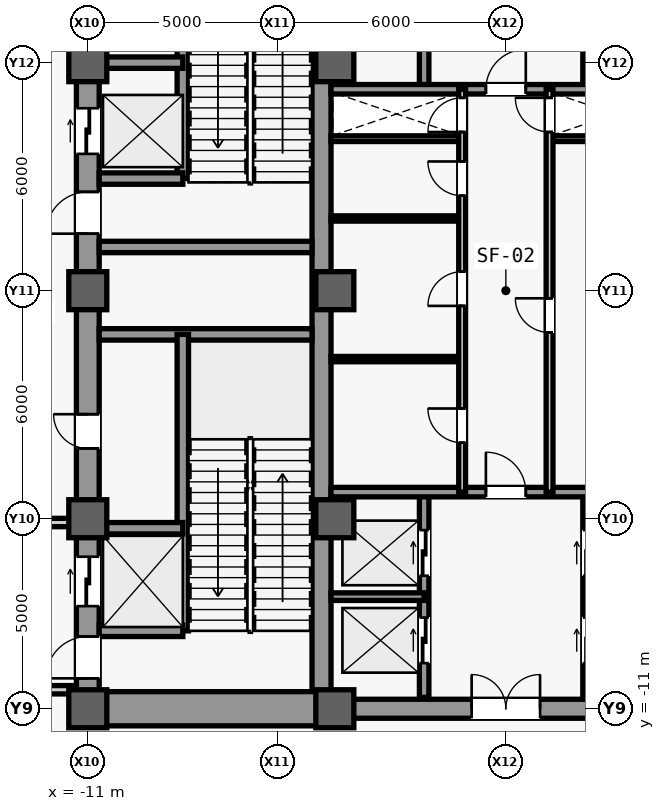
"""IFC4 building model, lengths in metres.
Left out: names, types, materials, properties, quantities, classifications, styles, units other than length and angle.
Written with IfcOpenShell. Run it as: python <this file> out.ifc"""

import sys

from ifc_helpers import new_model, si_unit, direction, frame, frame_2d, origin, origin_2d, place, context, subcontext, project, spatial, rectangle, extrude, source, transform, mapped, element, fill, save


model = new_model("IFC4")
c1 = context("Model", 3, precision=1e-05, world=origin(), true_north=direction((0.0, 1.0)))
c2 = subcontext(c1, "Body", "Model", "MODEL_VIEW")
j1 = project(units=[si_unit("LENGTHUNIT", "METRE"), si_unit("PLANEANGLEUNIT", "RADIAN")], contexts=[c1])
p1 = place(None, origin())
s1 = spatial("IfcSite", under=j1, at=p1, CompositionType="ELEMENT")
p2 = place(p1, origin())
s2 = spatial("IfcBuilding", under=s1, at=p2, CompositionType="ELEMENT")
p3 = place(p2, origin())
s3 = spatial("IfcBuildingStorey", under=s2, at=p3, CompositionType="ELEMENT", Elevation=0.0)
m1 = source(origin(), c2, "Body", "SweptSolid", [
    extrude(rectangle(XDim=22.0, YDim=0.6, at=frame_2d((11.0, 0.0))), origin(), (0.0, 0.0, 1.0), 6.28),
])
p4 = place(p3, frame((-11.0, -11.0, 0.0), z_axis=(0.0, 0.0, 1.0), x_axis=(0.0, 1.0, 0.0)))
e1 = element("IfcWall", 1, at=p4, inside=s3, PredefinedType="SHEAR", context=c2, shape_type="MappedRepresentation", body=[
    mapped(m1, transform((0.0, 0.0, 0.0), scale=1.0)),
])
m2 = source(origin(), c2, "Body", "SweptSolid", [
    extrude(rectangle(XDim=1.1, YDim=2.2, at=frame_2d((0.55, 1.1))), frame((0.0, 0.31, 0.0), z_axis=(0.0, -1.0, 0.0), x_axis=(1.0, 0.0, 0.0)), (0.0, 0.0, 1.0), 0.62),
])
p5 = place(p4, frame((0.8, 0.0, 0.0)))
e2 = element("IfcOpeningElement", 2, at=p5, cuts=e1, PredefinedType="OPENING", context=c2, shape_type="MappedRepresentation", body=[
    mapped(m2, transform((0.0, 0.0, 0.0), scale=1.0)),
])
p6 = place(p4, frame((12.5, 0.0, 0.0)))
e3 = element("IfcOpeningElement", 3, at=p6, cuts=e1, PredefinedType="OPENING", context=c2, shape_type="MappedRepresentation", body=[
    mapped(m2, transform((0.0, 0.0, 0.0), scale=1.0)),
])
m3 = source(origin(), c2, "Body", "SweptSolid", [
    extrude(rectangle(XDim=0.9, YDim=2.15, at=frame_2d((0.45, 1.075))), frame((0.0, 0.31, 0.0), z_axis=(0.0, -1.0, 0.0), x_axis=(1.0, 0.0, 0.0)), (0.0, 0.0, 1.0), 0.62),
])
p7 = place(p4, frame((6.85, 0.0, 0.0)))
e4 = element("IfcOpeningElement", 4, at=p7, cuts=e1, PredefinedType="OPENING", context=c2, shape_type="MappedRepresentation", body=[
    mapped(m3, transform((0.0, 0.0, 0.0), scale=1.0)),
])
m4 = source(origin(), c2, "Body", "SweptSolid", [
    extrude(rectangle(XDim=1.2, YDim=2.3, at=frame_2d((0.6, 1.15))), frame((0.0, 0.31, 0.0), z_axis=(0.0, -1.0, 0.0), x_axis=(1.0, 0.0, 0.0)), (0.0, 0.0, 1.0), 0.62),
])
p8 = place(p4, frame((14.6, 0.0, 0.0)))
e5 = element("IfcOpeningElement", 5, at=p8, cuts=e1, PredefinedType="OPENING", context=c2, shape_type="MappedRepresentation", body=[
    mapped(m4, transform((0.0, 0.0, 0.0), scale=1.0)),
])
p9 = place(p4, frame((18.2, 0.0, 0.0)))
e6 = element("IfcOpeningElement", 6, at=p9, cuts=e1, PredefinedType="OPENING", context=c2, shape_type="MappedRepresentation", body=[
    mapped(m4, transform((0.0, 0.0, 0.0), scale=1.0)),
])
m5 = source(origin(), c2, "Body", "SweptSolid", [
    extrude(rectangle(XDim=1.3, YDim=2.3, at=frame_2d((0.65, 1.15))), frame((0.0, 0.31, 0.0), z_axis=(0.0, -1.0, 0.0), x_axis=(1.0, 0.0, 0.0)), (0.0, 0.0, 1.0), 0.62),
])
p10 = place(p4, frame((2.7, 0.0, 0.0)))
e7 = element("IfcOpeningElement", 7, at=p10, cuts=e1, PredefinedType="OPENING", context=c2, shape_type="MappedRepresentation", body=[
    mapped(m5, transform((0.0, 0.0, 0.0), scale=1.0)),
])
m6 = source(origin(), c2, "Body", "SweptSolid", [
    extrude(rectangle(XDim=21.4, YDim=0.5, at=frame_2d((10.7, 0.0))), origin(), (0.0, 0.0, 1.0), 6.28),
])
p11 = place(p3, frame((-4.85, -10.7, 0.0), z_axis=(0.0, 0.0, 1.0), x_axis=(0.0, 1.0, 0.0)))
e8 = element("IfcWall", 8, at=p11, inside=s3, PredefinedType="SHEAR", context=c2, shape_type="MappedRepresentation", body=[
    mapped(m6, transform((0.0, 0.0, 0.0), scale=1.0)),
])
m7 = source(origin(), c2, "Body", "SweptSolid", [
    extrude(rectangle(XDim=5.85, YDim=0.9, at=frame_2d((2.925, 0.0))), origin(), (0.0, 0.0, 1.0), 6.28),
])
p12 = place(p3, frame((-10.7, -11.0, 0.0), z_axis=(0.0, 0.0, 1.0), x_axis=(1.0, 0.0, 0.0)))
e9 = element("IfcWall", 9, at=p12, inside=s3, PredefinedType="SHEAR", context=c2, shape_type="MappedRepresentation", body=[
    mapped(m7, transform((0.0, 0.0, 0.0), scale=1.0)),
])
m8 = source(origin(), c2, "Body", "SweptSolid", [
    extrude(rectangle(XDim=5.6, YDim=0.3, at=frame_2d((2.8, 0.0))), origin(), (0.0, 0.0, 1.0), 6.28),
])
for number, where, z_axis, x_axis in (
    (10, (-10.7, -1.15, 0.0), (0.0, 0.0, 1.0), (1.0, 0.0, 0.0)),
    (11, (-10.7, 1.15, 0.0), (0.0, 0.0, 1.0), (1.0, 0.0, 0.0)),
):
    element("IfcWall", number, at=place(p3, frame(where, z_axis=z_axis, x_axis=x_axis)), inside=s3, PredefinedType="SHEAR", context=c2, shape_type="MappedRepresentation", body=[
        mapped(m8, transform((0.0, 0.0, 0.0), scale=1.0)),
    ])
m9 = source(origin(), c2, "Body", "SweptSolid", [
    extrude(rectangle(XDim=9.2, YDim=0.5, at=frame_2d((4.6, 0.0))), origin(), (0.0, 0.0, 1.0), 6.28),
])
p13 = place(p3, frame((-4.6, -11.0, 0.0), z_axis=(0.0, 0.0, 1.0), x_axis=(1.0, 0.0, 0.0)))
e12 = element("IfcWall", 12, at=p13, inside=s3, PredefinedType="SHEAR", context=c2, shape_type="MappedRepresentation", body=[
    mapped(m9, transform((0.0, 0.0, 0.0), scale=1.0)),
])
m10 = source(origin(), c2, "Body", "SweptSolid", [
    extrude(rectangle(XDim=1.8, YDim=2.25, at=frame_2d((0.9, 1.125))), frame((0.0, 0.26, 0.0), z_axis=(0.0, -1.0, 0.0), x_axis=(1.0, 0.0, 0.0)), (0.0, 0.0, 1.0), 0.52),
])
p14 = place(p13, frame((3.7, 0.0, 0.0)))
e13 = element("IfcOpeningElement", 13, at=p14, cuts=e12, PredefinedType="OPENING", context=c2, shape_type="MappedRepresentation", body=[
    mapped(m10, transform((0.0, 0.0, 0.0), scale=1.0)),
])
m11 = source(origin(), c2, "Body", "SweptSolid", [
    extrude(rectangle(XDim=1.0, YDim=1.0, at=origin_2d()), origin(), (0.0, 0.0, 1.0), 6.6),
])
for number, where, z_axis, x_axis in (
    (14, (-11.0, -11.0, 0.0), (0.0, 0.0, 1.0), (1.0, 0.0, 0.0)),
    (15, (-11.0, -6.0, 0.0), (0.0, 0.0, 1.0), (1.0, 0.0, 0.0)),
    (16, (-11.0, 0.0, 0.0), (0.0, 0.0, 1.0), (1.0, 0.0, 0.0)),
    (17, (-11.0, 6.0, 0.0), (0.0, 0.0, 1.0), (1.0, 0.0, 0.0)),
    (18, (-4.5, -11.0, 0.0), (0.0, 0.0, 1.0), (1.0, 0.0, 0.0)),
    (19, (-4.5, -6.0, 0.0), (0.0, 0.0, 1.0), (1.0, 0.0, 0.0)),
    (20, (-4.5, 0.0, 0.0), (0.0, 0.0, 1.0), (1.0, 0.0, 0.0)),
    (21, (-4.5, 6.0, 0.0), (0.0, 0.0, 1.0), (1.0, 0.0, 0.0)),
):
    element("IfcColumn", number, at=place(p3, frame(where, z_axis=z_axis, x_axis=x_axis)), inside=s3, PredefinedType="COLUMN", context=c2, shape_type="MappedRepresentation", body=[
        mapped(m11, transform((0.0, 0.0, 0.0), scale=1.0)),
    ])
m12 = source(origin(), c2, "Body", "SweptSolid", [
    extrude(rectangle(XDim=7.8, YDim=0.3, at=frame_2d((3.9, 0.0))), origin(), (0.0, 0.0, 1.0), 6.28),
])
p15 = place(p3, frame((-8.5, -8.95, 0.0), z_axis=(0.0, 0.0, 1.0), x_axis=(0.0, 1.0, 0.0)))
e22 = element("IfcWall", 22, at=p15, inside=s3, PredefinedType="SHEAR", context=c2, shape_type="MappedRepresentation", body=[
    mapped(m12, transform((0.0, 0.0, 0.0), scale=1.0)),
])
m13 = source(origin(), c2, "Body", "SweptSolid", [
    extrude(rectangle(XDim=2.2, YDim=0.3, at=frame_2d((1.1, 0.0))), origin(), (0.0, 0.0, 1.0), 6.28),
])
for number, where, z_axis, x_axis in (
    (23, (-10.7, -8.95, 0.0), (0.0, 0.0, 1.0), (1.0, 0.0, 0.0)),
    (24, (-10.7, -6.25, 0.0), (0.0, 0.0, 1.0), (1.0, 0.0, 0.0)),
):
    element("IfcWall", number, at=place(p3, frame(where, z_axis=z_axis, x_axis=x_axis)), inside=s3, PredefinedType="SHEAR", context=c2, shape_type="MappedRepresentation", body=[
        mapped(m13, transform((0.0, 0.0, 0.0), scale=1.0)),
    ])
m14 = source(origin(), c2, "Body", "SweptSolid", [
    extrude(rectangle(XDim=7.75, YDim=0.3, at=frame_2d((3.875, 0.0))), origin(), (0.0, 0.0, 1.0), 6.28),
])
p16 = place(p3, frame((-8.5, 2.95, 0.0), z_axis=(0.0, 0.0, 1.0), x_axis=(0.0, 1.0, 0.0)))
e25 = element("IfcWall", 25, at=p16, inside=s3, PredefinedType="SHEAR", context=c2, shape_type="MappedRepresentation", body=[
    mapped(m14, transform((0.0, 0.0, 0.0), scale=1.0)),
])
for number, where, z_axis, x_axis in (
    (26, (-10.7, 2.95, 0.0), (0.0, 0.0, 1.0), (1.0, 0.0, 0.0)),
    (27, (-10.7, 6.0, 0.0), (0.0, 0.0, 1.0), (1.0, 0.0, 0.0)),
):
    element("IfcWall", number, at=place(p3, frame(where, z_axis=z_axis, x_axis=x_axis)), inside=s3, PredefinedType="SHEAR", context=c2, shape_type="MappedRepresentation", body=[
        mapped(m13, transform((0.0, 0.0, 0.0), scale=1.0)),
    ])
m15 = source(origin(), c2, "Body", "SweptSolid", [
    extrude(rectangle(XDim=4.05, YDim=0.22, at=frame_2d((2.025, 0.0))), origin(), (0.0, 0.0, 1.0), 6.28),
])
for number, where, z_axis, x_axis in (
    (28, (-15.35, -10.5, 0.0), (0.0, 0.0, 1.0), (1.0, 0.0, 0.0)),
    (29, (-15.35, -6.1, 0.0), (0.0, 0.0, 1.0), (1.0, 0.0, 0.0)),
):
    element("IfcWall", number, at=place(p3, frame(where, z_axis=z_axis, x_axis=x_axis)), inside=s3, PredefinedType="PARTITIONING", context=c2, shape_type="MappedRepresentation", body=[
        mapped(m15, transform((0.0, 0.0, 0.0), scale=1.0)),
    ])
m16 = source(origin(), c2, "Body", "SweptSolid", [
    extrude(rectangle(XDim=3.45, YDim=0.15, at=frame_2d((1.725, 0.0))), origin(), (0.0, 0.0, 1.0), 6.28),
])
for number, where, z_axis, x_axis in (
    (30, (-4.6, 4.0, 0.0), (0.0, 0.0, 1.0), (1.0, 0.0, 0.0)),
    (31, (1.15, 4.0, 0.0), (0.0, 0.0, 1.0), (1.0, 0.0, 0.0)),
):
    element("IfcWall", number, at=place(p3, frame(where, z_axis=z_axis, x_axis=x_axis)), inside=s3, PredefinedType="PARTITIONING", context=c2, shape_type="MappedRepresentation", body=[
        mapped(m16, transform((0.0, 0.0, 0.0), scale=1.0)),
    ])
m17 = source(origin(), c2, "Body", "SweptSolid", [
    extrude(rectangle(XDim=5.4, YDim=0.25, at=frame_2d((2.7, 0.0))), origin(), (0.0, 0.0, 1.0), 6.28),
])
p17 = place(p3, frame((-2.15, -10.7, 0.0), z_axis=(0.0, 0.0, 1.0), x_axis=(0.0, 1.0, 0.0)))
e32 = element("IfcWall", 32, at=p17, inside=s3, PredefinedType="SHEAR", context=c2, shape_type="MappedRepresentation", body=[
    mapped(m17, transform((0.0, 0.0, 0.0), scale=1.0)),
])
m18 = source(origin(), c2, "Body", "SweptSolid", [
    extrude(rectangle(XDim=1.2, YDim=2.3, at=frame_2d((0.6, 1.15))), frame((0.0, 0.135, 0.0), z_axis=(0.0, -1.0, 0.0), x_axis=(1.0, 0.0, 0.0)), (0.0, 0.0, 1.0), 0.27),
])
p18 = place(p17, frame((0.9, 0.0, 0.0)))
e33 = element("IfcOpeningElement", 33, at=p18, cuts=e32, PredefinedType="OPENING", context=c2, shape_type="MappedRepresentation", body=[
    mapped(m18, transform((0.0, 0.0, 0.0), scale=1.0)),
])
p19 = place(p17, frame((3.2, 0.0, 0.0)))
e34 = element("IfcOpeningElement", 34, at=p19, cuts=e32, PredefinedType="OPENING", context=c2, shape_type="MappedRepresentation", body=[
    mapped(m18, transform((0.0, 0.0, 0.0), scale=1.0)),
])
p20 = place(p3, frame((2.15, -10.7, 0.0), z_axis=(0.0, 0.0, 1.0), x_axis=(0.0, 1.0, 0.0)))
e35 = element("IfcWall", 35, at=p20, inside=s3, PredefinedType="SHEAR", context=c2, shape_type="MappedRepresentation", body=[
    mapped(m17, transform((0.0, 0.0, 0.0), scale=1.0)),
])
p21 = place(p20, frame((0.9, 0.0, 0.0)))
e36 = element("IfcOpeningElement", 36, at=p21, cuts=e35, PredefinedType="OPENING", context=c2, shape_type="MappedRepresentation", body=[
    mapped(m18, transform((0.0, 0.0, 0.0), scale=1.0)),
])
p22 = place(p20, frame((3.2, 0.0, 0.0)))
e37 = element("IfcOpeningElement", 37, at=p22, cuts=e35, PredefinedType="OPENING", context=c2, shape_type="MappedRepresentation", body=[
    mapped(m18, transform((0.0, 0.0, 0.0), scale=1.0)),
])
m19 = source(origin(), c2, "Body", "SweptSolid", [
    extrude(rectangle(XDim=2.45, YDim=0.2, at=frame_2d((1.225, 0.0))), origin(), (0.0, 0.0, 1.0), 6.28),
])
p23 = place(p3, frame((-4.6, -8.05, 0.0), z_axis=(0.0, 0.0, 1.0), x_axis=(1.0, 0.0, 0.0)))
e38 = element("IfcWall", 38, at=p23, inside=s3, PredefinedType="SHEAR", context=c2, shape_type="MappedRepresentation", body=[
    mapped(m19, transform((0.0, 0.0, 0.0), scale=1.0)),
])
m20 = source(origin(), c2, "Body", "SweptSolid", [
    extrude(rectangle(XDim=9.2, YDim=0.25, at=frame_2d((4.6, 0.0))), origin(), (0.0, 0.0, 1.0), 6.28),
])
p24 = place(p3, frame((-4.6, -5.3, 0.0), z_axis=(0.0, 0.0, 1.0), x_axis=(1.0, 0.0, 0.0)))
e39 = element("IfcWall", 39, at=p24, inside=s3, PredefinedType="SHEAR", context=c2, shape_type="MappedRepresentation", body=[
    mapped(m20, transform((0.0, 0.0, 0.0), scale=1.0)),
])
m21 = source(origin(), c2, "Body", "SweptSolid", [
    extrude(rectangle(XDim=1.05, YDim=2.2, at=frame_2d((0.525, 1.1))), frame((0.0, 0.135, 0.0), z_axis=(0.0, -1.0, 0.0), x_axis=(1.0, 0.0, 0.0)), (0.0, 0.0, 1.0), 0.27),
])
p25 = place(p24, frame((4.075, 0.0, 0.0)))
e40 = element("IfcOpeningElement", 40, at=p25, cuts=e39, PredefinedType="OPENING", context=c2, shape_type="MappedRepresentation", body=[
    mapped(m21, transform((0.0, 0.0, 0.0), scale=1.0)),
])
p26 = place(p3, frame((-2.15, 5.3, 0.0), z_axis=(0.0, 0.0, 1.0), x_axis=(0.0, 1.0, 0.0)))
e41 = element("IfcWall", 41, at=p26, inside=s3, PredefinedType="SHEAR", context=c2, shape_type="MappedRepresentation", body=[
    mapped(m17, transform((0.0, 0.0, 0.0), scale=1.0)),
])
p27 = place(p26, frame((3.3, 0.0, 0.0)))
e42 = element("IfcOpeningElement", 42, at=p27, cuts=e41, PredefinedType="OPENING", context=c2, shape_type="MappedRepresentation", body=[
    mapped(m18, transform((0.0, 0.0, 0.0), scale=1.0)),
])
p28 = place(p3, frame((2.15, 5.3, 0.0), z_axis=(0.0, 0.0, 1.0), x_axis=(0.0, 1.0, 0.0)))
e43 = element("IfcWall", 43, at=p28, inside=s3, PredefinedType="SHEAR", context=c2, shape_type="MappedRepresentation", body=[
    mapped(m17, transform((0.0, 0.0, 0.0), scale=1.0)),
])
p29 = place(p28, frame((3.3, 0.0, 0.0)))
e44 = element("IfcOpeningElement", 44, at=p29, cuts=e43, PredefinedType="OPENING", context=c2, shape_type="MappedRepresentation", body=[
    mapped(m18, transform((0.0, 0.0, 0.0), scale=1.0)),
])
p30 = place(p3, frame((-4.6, 5.3, 0.0), z_axis=(0.0, 0.0, 1.0), x_axis=(1.0, 0.0, 0.0)))
e45 = element("IfcWall", 45, at=p30, inside=s3, PredefinedType="SHEAR", context=c2, shape_type="MappedRepresentation", body=[
    mapped(m20, transform((0.0, 0.0, 0.0), scale=1.0)),
])
p31 = place(p30, frame((4.075, 0.0, 0.0)))
e46 = element("IfcOpeningElement", 46, at=p31, cuts=e45, PredefinedType="OPENING", context=c2, shape_type="MappedRepresentation", body=[
    mapped(m21, transform((0.0, 0.0, 0.0), scale=1.0)),
])
m22 = source(origin(), c2, "Body", "SweptSolid", [
    extrude(rectangle(XDim=3.45, YDim=0.14, at=frame_2d((1.725, 0.0))), origin(), (0.0, 0.0, 1.0), 6.28),
])
for number, where, z_axis, x_axis in (
    (47, (-4.6, -1.8, 0.0), (0.0, 0.0, 1.0), (1.0, 0.0, 0.0)),
    (48, (-4.6, 1.9, 0.0), (0.0, 0.0, 1.0), (1.0, 0.0, 0.0)),
):
    element("IfcWall", number, at=place(p3, frame(where, z_axis=z_axis, x_axis=x_axis)), inside=s3, PredefinedType="PARTITIONING", context=c2, shape_type="MappedRepresentation", body=[
        mapped(m22, transform((0.0, 0.0, 0.0), scale=1.0)),
    ])
m23 = source(origin(), c2, "Body", "SweptSolid", [
    extrude(rectangle(XDim=10.6, YDim=0.18, at=frame_2d((5.3, 0.0))), origin(), (0.0, 0.0, 1.0), 6.28),
])
p32 = place(p3, frame((-1.15, -5.3, 0.0), z_axis=(0.0, 0.0, 1.0), x_axis=(0.0, 1.0, 0.0)))
e49 = element("IfcWall", 49, at=p32, inside=s3, PredefinedType="PARTITIONING", context=c2, shape_type="MappedRepresentation", body=[
    mapped(m23, transform((0.0, 0.0, 0.0), scale=1.0)),
])
m24 = source(origin(), c2, "Body", "SweptSolid", [
    extrude(rectangle(XDim=0.9, YDim=2.15, at=frame_2d((0.45, 1.075))), frame((0.0, 0.1, 0.0), z_axis=(0.0, -1.0, 0.0), x_axis=(1.0, 0.0, 0.0)), (0.0, 0.0, 1.0), 0.2),
])
p33 = place(p32, frame((1.3, 0.0, 0.0)))
e50 = element("IfcOpeningElement", 50, at=p33, cuts=e49, PredefinedType="OPENING", context=c2, shape_type="MappedRepresentation", body=[
    mapped(m24, transform((0.0, 0.0, 0.0), scale=1.0)),
])
p34 = place(p32, frame((4.9, 0.0, 0.0)))
e51 = element("IfcOpeningElement", 51, at=p34, cuts=e49, PredefinedType="OPENING", context=c2, shape_type="MappedRepresentation", body=[
    mapped(m24, transform((0.0, 0.0, 0.0), scale=1.0)),
])
p35 = place(p32, frame((7.8, 0.0, 0.0)))
e52 = element("IfcOpeningElement", 52, at=p35, cuts=e49, PredefinedType="OPENING", context=c2, shape_type="MappedRepresentation", body=[
    mapped(m24, transform((0.0, 0.0, 0.0), scale=1.0)),
])
p36 = place(p32, frame((9.475, 0.0, 0.0)))
e53 = element("IfcOpeningElement", 53, at=p36, cuts=e49, PredefinedType="OPENING", context=c2, shape_type="MappedRepresentation", body=[
    mapped(m24, transform((0.0, 0.0, 0.0), scale=1.0)),
])
p37 = place(p3, frame((1.15, -5.3, 0.0), z_axis=(0.0, 0.0, 1.0), x_axis=(0.0, 1.0, 0.0)))
e54 = element("IfcWall", 54, at=p37, inside=s3, PredefinedType="PARTITIONING", context=c2, shape_type="MappedRepresentation", body=[
    mapped(m23, transform((0.0, 0.0, 0.0), scale=1.0)),
])
p38 = place(p37, frame((4.2, 0.0, 0.0)))
e55 = element("IfcOpeningElement", 55, at=p38, cuts=e54, PredefinedType="OPENING", context=c2, shape_type="MappedRepresentation", body=[
    mapped(m24, transform((0.0, 0.0, 0.0), scale=1.0)),
])
p39 = place(p37, frame((9.475, 0.0, 0.0)))
e56 = element("IfcOpeningElement", 56, at=p39, cuts=e54, PredefinedType="OPENING", context=c2, shape_type="MappedRepresentation", body=[
    mapped(m24, transform((0.0, 0.0, 0.0), scale=1.0)),
])
m25 = source(origin(), c2, "Body", "SweptSolid", [
    extrude(rectangle(XDim=1.1, YDim=2.2, at=frame_2d((0.55, 1.1))), frame((0.0, 0.025, 0.0), z_axis=(0.0, -1.0, 0.0), x_axis=(1.0, 0.0, 0.0)), (0.0, 0.0, 1.0), 0.05),
])
p40 = place(p5, origin())
e57 = element("IfcDoor", 57, at=p40, inside=s3, OperationType="SINGLE_SWING_LEFT", PredefinedType="DOOR", context=c2, shape_type="MappedRepresentation", body=[
    mapped(m25, transform((0.0, 0.0, 0.0), scale=1.0)),
])
fill(e2, e57)
p41 = place(p6, origin())
e58 = element("IfcDoor", 58, at=p41, inside=s3, OperationType="SINGLE_SWING_LEFT", PredefinedType="DOOR", context=c2, shape_type="MappedRepresentation", body=[
    mapped(m25, transform((0.0, 0.0, 0.0), scale=1.0)),
])
fill(e3, e58)
m26 = source(origin(), c2, "Body", "SweptSolid", [
    extrude(rectangle(XDim=0.9, YDim=2.15, at=frame_2d((0.45, 1.075))), frame((0.0, 0.025, 0.0), z_axis=(0.0, -1.0, 0.0), x_axis=(1.0, 0.0, 0.0)), (0.0, 0.0, 1.0), 0.05),
])
p42 = place(p7, origin())
e59 = element("IfcDoor", 59, at=p42, inside=s3, OperationType="SINGLE_SWING_RIGHT", PredefinedType="DOOR", context=c2, shape_type="MappedRepresentation", body=[
    mapped(m26, transform((0.0, 0.0, 0.0), scale=1.0)),
])
fill(e4, e59)
m27 = source(origin(), c2, "Body", "SweptSolid", [
    extrude(rectangle(XDim=1.05, YDim=2.2, at=frame_2d((0.525, 1.1))), frame((0.0, 0.025, 0.0), z_axis=(0.0, -1.0, 0.0), x_axis=(1.0, 0.0, 0.0)), (0.0, 0.0, 1.0), 0.05),
])
p43 = place(p25, origin())
e60 = element("IfcDoor", 60, at=p43, inside=s3, OperationType="SINGLE_SWING_LEFT", PredefinedType="DOOR", context=c2, shape_type="MappedRepresentation", body=[
    mapped(m27, transform((0.0, 0.0, 0.0), scale=1.0)),
])
fill(e40, e60)
m28 = source(origin(), c2, "Body", "SweptSolid", [
    extrude(rectangle(XDim=1.8, YDim=2.25, at=frame_2d((0.9, 1.125))), frame((0.0, 0.025, 0.0), z_axis=(0.0, -1.0, 0.0), x_axis=(1.0, 0.0, 0.0)), (0.0, 0.0, 1.0), 0.05),
])
p44 = place(p14, origin())
e61 = element("IfcDoor", 61, at=p44, inside=s3, OperationType="SINGLE_SWING_LEFT", PredefinedType="DOOR", context=c2, shape_type="MappedRepresentation", body=[
    mapped(m28, transform((0.0, 0.0, 0.0), scale=1.0)),
])
fill(e13, e61)
p45 = place(p31, origin())
e62 = element("IfcDoor", 62, at=p45, inside=s3, OperationType="SINGLE_SWING_RIGHT", PredefinedType="DOOR", context=c2, shape_type="MappedRepresentation", body=[
    mapped(m27, transform((0.0, 0.0, 0.0), scale=1.0)),
])
fill(e46, e62)
p46 = place(p33, origin())
e63 = element("IfcDoor", 63, at=p46, inside=s3, OperationType="SINGLE_SWING_RIGHT", PredefinedType="DOOR", context=c2, shape_type="MappedRepresentation", body=[
    mapped(m26, transform((0.0, 0.0, 0.0), scale=1.0)),
])
fill(e50, e63)
p47 = place(p34, origin())
e64 = element("IfcDoor", 64, at=p47, inside=s3, OperationType="SINGLE_SWING_LEFT", PredefinedType="DOOR", context=c2, shape_type="MappedRepresentation", body=[
    mapped(m26, transform((0.0, 0.0, 0.0), scale=1.0)),
])
fill(e51, e64)
p48 = place(p35, origin())
e65 = element("IfcDoor", 65, at=p48, inside=s3, OperationType="SINGLE_SWING_RIGHT", PredefinedType="DOOR", context=c2, shape_type="MappedRepresentation", body=[
    mapped(m26, transform((0.0, 0.0, 0.0), scale=1.0)),
])
fill(e52, e65)
p49 = place(p38, origin())
e66 = element("IfcDoor", 66, at=p49, inside=s3, OperationType="SINGLE_SWING_RIGHT", PredefinedType="DOOR", context=c2, shape_type="MappedRepresentation", body=[
    mapped(m26, transform((0.0, 0.0, 0.0), scale=1.0)),
])
fill(e55, e66)
p50 = place(p36, origin())
e67 = element("IfcDoor", 67, at=p50, inside=s3, OperationType="SINGLE_SWING_LEFT", PredefinedType="DOOR", context=c2, shape_type="MappedRepresentation", body=[
    mapped(m26, transform((0.0, 0.0, 0.0), scale=1.0)),
])
fill(e53, e67)
p51 = place(p39, origin())
e68 = element("IfcDoor", 68, at=p51, inside=s3, OperationType="SINGLE_SWING_RIGHT", PredefinedType="DOOR", context=c2, shape_type="MappedRepresentation", body=[
    mapped(m26, transform((0.0, 0.0, 0.0), scale=1.0)),
])
fill(e56, e68)
m29 = source(origin(), c2, "Body", "SweptSolid", [
    extrude(rectangle(XDim=1.2, YDim=2.3, at=frame_2d((0.6, 1.15))), frame((0.0, 0.025, 0.0), z_axis=(0.0, -1.0, 0.0), x_axis=(1.0, 0.0, 0.0)), (0.0, 0.0, 1.0), 0.05),
])
p52 = place(p18, origin())
e69 = element("IfcDoor", 69, at=p52, inside=s3, OperationType="SLIDING_TO_LEFT", PredefinedType="DOOR", context=c2, shape_type="MappedRepresentation", body=[
    mapped(m29, transform((0.0, 0.0, 0.0), scale=1.0)),
])
fill(e33, e69)
p53 = place(p19, origin())
e70 = element("IfcDoor", 70, at=p53, inside=s3, OperationType="SLIDING_TO_LEFT", PredefinedType="DOOR", context=c2, shape_type="MappedRepresentation", body=[
    mapped(m29, transform((0.0, 0.0, 0.0), scale=1.0)),
])
fill(e34, e70)
p54 = place(p8, origin())
e71 = element("IfcDoor", 71, at=p54, inside=s3, OperationType="SLIDING_TO_LEFT", PredefinedType="DOOR", context=c2, shape_type="MappedRepresentation", body=[
    mapped(m29, transform((0.0, 0.0, 0.0), scale=1.0)),
])
fill(e5, e71)
m30 = source(origin(), c2, "Body", "SweptSolid", [
    extrude(rectangle(XDim=1.3, YDim=2.3, at=frame_2d((0.65, 1.15))), frame((0.0, 0.025, 0.0), z_axis=(0.0, -1.0, 0.0), x_axis=(1.0, 0.0, 0.0)), (0.0, 0.0, 1.0), 0.05),
])
p55 = place(p10, origin())
e72 = element("IfcDoor", 72, at=p55, inside=s3, OperationType="SLIDING_TO_LEFT", PredefinedType="DOOR", context=c2, shape_type="MappedRepresentation", body=[
    mapped(m30, transform((0.0, 0.0, 0.0), scale=1.0)),
])
fill(e7, e72)
save(model, sys.argv[1])
